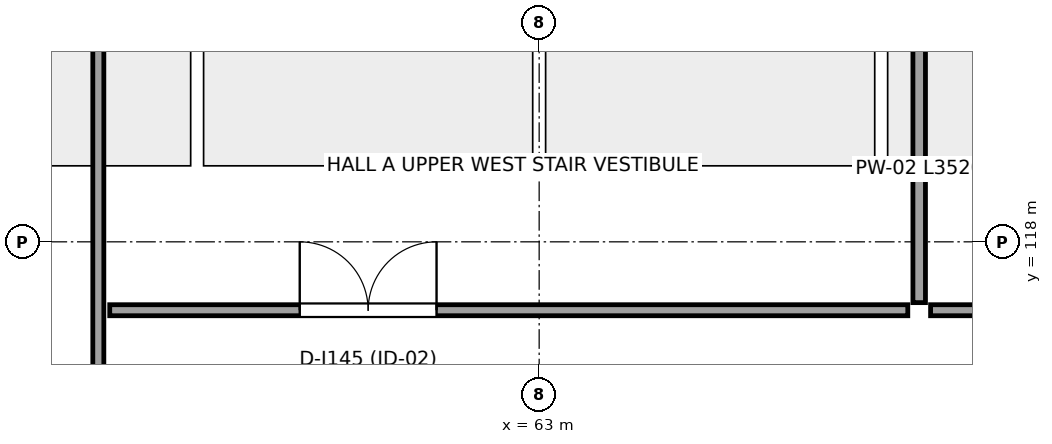
"""IFC4 building model, lengths in metres.
Left out: names, types, materials, properties, quantities, classifications, styles, units other than length and angle.
Written with IfcOpenShell. Run it as: python <this file> out.ifc"""

import sys

from ifc_helpers import new_model, si_unit, direction, frame, frame_2d, origin, place, context, subcontext, project, spatial, rectangle, extrude, element, fill, save


model = new_model("IFC4")
c1 = context("Model", 3, precision=1e-05, world=origin(), true_north=direction((0.0, 1.0)))
c2 = subcontext(c1, "Body", "Model", "MODEL_VIEW")
j1 = project(units=[si_unit("LENGTHUNIT", "METRE"), si_unit("PLANEANGLEUNIT", "RADIAN")], contexts=[c1])
p1 = place(None, origin())
s1 = spatial("IfcSite", under=j1, at=p1, CompositionType="ELEMENT")
p2 = place(p1, origin())
s2 = spatial("IfcBuilding", under=s1, at=p2, CompositionType="ELEMENT")
p3 = place(p2, frame((0.0, 0.0, 12.0)))
s3 = spatial("IfcBuildingStorey", under=s2, at=p3, CompositionType="ELEMENT", Elevation=12.0)
p4 = place(p3, frame((57.35, 117.1, 0.0), z_axis=(0.0, 0.0, 1.0), x_axis=(1.0, 0.0, 0.0)))
e1 = element("IfcWall", 1, at=p4, inside=s3, PredefinedType="PARTITIONING", context=c2, shape_type="SweptSolid", body=[
    extrude(rectangle(XDim=10.5, YDim=0.145, at=frame_2d((5.25, 0.0))), origin(), (0.0, 0.0, 1.0), 2.95),
])
p5 = place(p4, frame((2.5, 0.0, 0.0)))
e2 = element("IfcOpeningElement", 2, at=p5, cuts=e1, PredefinedType="OPENING", context=c2, shape_type="SweptSolid", body=[
    extrude(rectangle(XDim=1.8, YDim=2.3, at=frame_2d((0.9, 1.15))), frame((0.0, 0.083, 0.0), z_axis=(0.0, -1.0, 0.0), x_axis=(1.0, 0.0, 0.0)), (0.0, 0.0, 1.0), 0.165),
])
p6 = place(p3, frame((68.15, 117.1, 0.0), z_axis=(0.0, 0.0, 1.0), x_axis=(1.0, 0.0, 0.0)))
e3 = element("IfcWall", 3, at=p6, inside=s3, PredefinedType="PARTITIONING", context=c2, shape_type="SweptSolid", body=[
    extrude(rectangle(XDim=17.3, YDim=0.145, at=frame_2d((8.65, 0.0))), origin(), (0.0, 0.0, 1.0), 2.95),
])
p7 = place(p6, frame((2.5, 0.0, 0.0)))
e4 = element("IfcOpeningElement", 4, at=p7, cuts=e3, PredefinedType="OPENING", context=c2, shape_type="SweptSolid", body=[
    extrude(rectangle(XDim=1.8, YDim=2.3, at=frame_2d((0.9, 1.15))), frame((0.0, 0.083, 0.0), z_axis=(0.0, -1.0, 0.0), x_axis=(1.0, 0.0, 0.0)), (0.0, 0.0, 1.0), 0.165),
])
p8 = place(p3, frame((68.0, 117.2, 0.0), z_axis=(0.0, 0.0, 1.0), x_axis=(0.0, 1.0, 0.0)))
e5 = element("IfcWall", 5, at=p8, inside=s3, PredefinedType="PARTITIONING", context=c2, shape_type="SweptSolid", body=[
    extrude(rectangle(XDim=3.52, YDim=0.165, at=frame_2d((1.76, 0.0))), origin(), (0.0, 0.0, 1.0), 2.95),
])
p9 = place(p3, frame((57.2, 111.948, 0.0), z_axis=(0.0, 0.0, 1.0), x_axis=(0.0, 1.0, 0.0)))
e6 = element("IfcWall", 6, at=p9, inside=s3, PredefinedType="PARTITIONING", context=c2, shape_type="SweptSolid", body=[
    extrude(rectangle(XDim=8.704, YDim=0.145, at=frame_2d((4.352, 0.0))), origin(), (0.0, 0.0, 1.0), 2.95),
])
p10 = place(p5, origin())
e7 = element("IfcDoor", 7, at=p10, inside=s3, OperationType="DOUBLE_DOOR_SINGLE_SWING", PredefinedType="DOOR", context=c2, shape_type="SweptSolid", body=[
    extrude(rectangle(XDim=1.8, YDim=2.3, at=frame_2d((0.9, 1.15))), frame((0.0, 0.025, 0.0), z_axis=(0.0, -1.0, 0.0), x_axis=(1.0, 0.0, 0.0)), (0.0, 0.0, 1.0), 0.05),
])
fill(e2, e7)
save(model, sys.argv[1])
